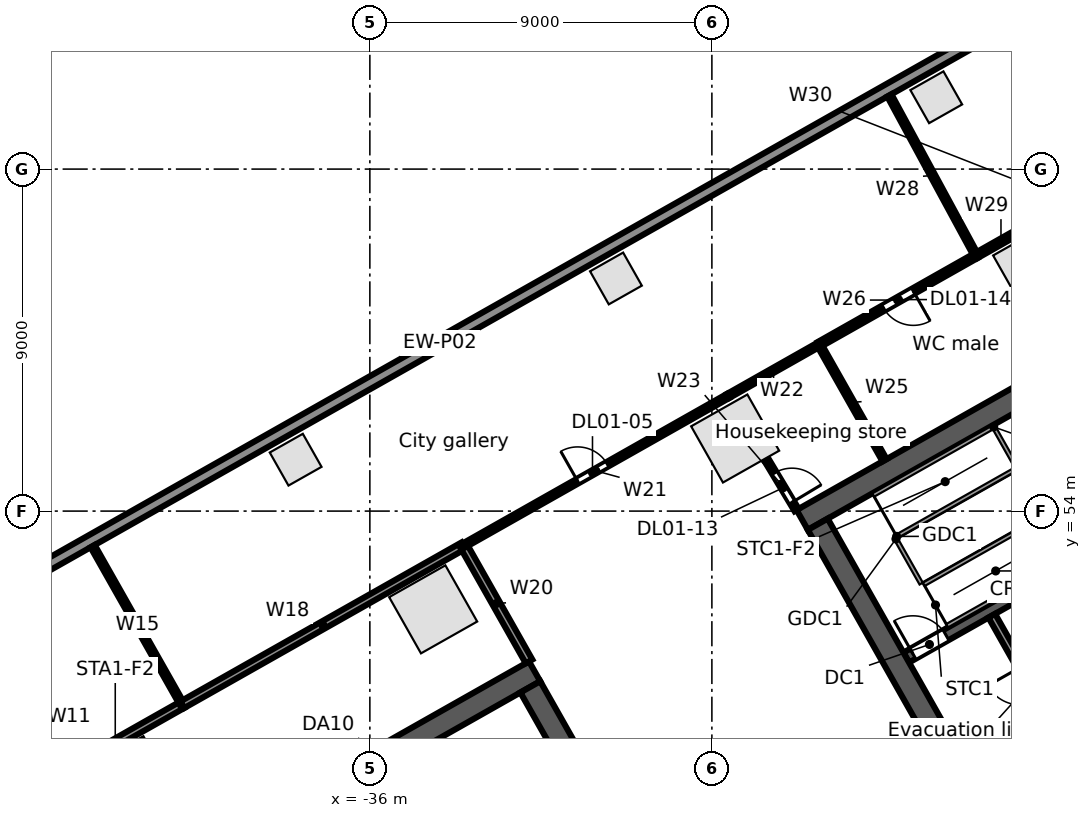
"""IFC4 building model, lengths in metres.
Left out: names, types, materials, properties, quantities, classifications, styles, units other than length and angle.
Written with IfcOpenShell. Run it as: python <this file> out.ifc"""

import sys

from ifc_helpers import new_model, si_unit, direction, frame, frame_2d, origin, origin_2d, place, context, subcontext, project, spatial, rectangle, extrude, element, fill, save


model = new_model("IFC4")
c1 = context("Model", 3, precision=1e-05, world=origin(), true_north=direction((0.0, 1.0)))
c2 = subcontext(c1, "Body", "Model", "MODEL_VIEW")
j1 = project(units=[si_unit("LENGTHUNIT", "METRE"), si_unit("PLANEANGLEUNIT", "RADIAN")], contexts=[c1])
p1 = place(None, origin())
s1 = spatial("IfcSite", under=j1, at=p1, CompositionType="ELEMENT")
p2 = place(p1, origin())
s2 = spatial("IfcBuilding", under=s1, at=p2, CompositionType="ELEMENT")
p3 = place(p2, frame((0.0, 0.0, 11.5)))
s3 = spatial("IfcBuildingStorey", under=s2, at=p3, CompositionType="ELEMENT", Elevation=11.5)
for number, where, z_axis, x_axis in (
    (1, (-18.441, 60.406, 0.0), (0.0, 0.0, 1.0), (-0.87, -0.492, 0.0)),
    (2, (-26.388, 55.91, 0.0), (0.0, 0.0, 1.0), (-0.87, -0.492, 0.0)),
    (3, (-34.334, 51.414, 0.0), (0.0, 0.0, 1.0), (-0.87, -0.492, 0.0)),
    (4, (-42.28, 46.919, 0.0), (0.0, 0.0, 1.0), (-0.87, -0.492, 0.0)),
):
    element("IfcColumn", number, at=place(p3, frame(where, z_axis=z_axis, x_axis=x_axis)), inside=s3, PredefinedType="COLUMN", context=c2, shape_type="SweptSolid", body=[
        extrude(rectangle(XDim=1.7, YDim=1.7, at=origin_2d()), origin(), (0.0, 0.0, 1.0), 5.0),
    ])
for number, where, z_axis, x_axis in (
    (5, (-21.096, 64.89, 0.0), (0.0, 0.0, 1.0), (-0.87, -0.492, 0.0)),
    (6, (-29.524, 60.122, 0.0), (0.0, 0.0, 1.0), (-0.87, -0.492, 0.0)),
    (7, (-37.953, 55.353, 0.0), (0.0, 0.0, 1.0), (-0.87, -0.492, 0.0)),
):
    element("IfcColumn", number, at=place(p3, frame(where, z_axis=z_axis, x_axis=x_axis)), inside=s3, PredefinedType="COLUMN", context=c2, shape_type="SweptSolid", body=[
        extrude(rectangle(XDim=1.0, YDim=1.0, at=origin_2d()), origin(), (0.0, 0.0, 1.0), 5.0),
    ])
p4 = place(p3, frame((-63.707, 41.701, 0.0), z_axis=(0.0, 0.0, 1.0), x_axis=(0.870355510268, 0.492423888277, 0.0)))
e8 = element("IfcWall", 8, at=p4, inside=s3, PredefinedType="STANDARD", context=c2, shape_type="SweptSolid", body=[
    extrude(rectangle(XDim=67.903, YDim=0.3, at=frame_2d((33.952, 0.0))), origin(), (0.0, 0.0, 1.0), 4.65),
])
p5 = place(p3, frame((-46.461, 41.412, 0.0), z_axis=(0.0, 0.0, 1.0), x_axis=(0.870350116061, 0.492433422375, 0.0)))
e9 = element("IfcWall", 9, at=p5, inside=s3, PredefinedType="SOLIDWALL", context=c2, shape_type="SweptSolid", body=[
    extrude(rectangle(XDim=17.0, YDim=0.6, at=frame_2d((8.5, 0.0))), origin(), (0.0, 0.0, 1.0), 4.65),
])
p6 = place(p3, frame((-31.778, 49.374, 0.0), z_axis=(0.0, 0.0, 1.0), x_axis=(0.492433046652, -0.870350328641, 0.0)))
e10 = element("IfcWall", 10, at=p6, inside=s3, PredefinedType="SOLIDWALL", context=c2, shape_type="SweptSolid", body=[
    extrude(rectangle(XDim=12.8, YDim=0.6, at=frame_2d((6.4, 0.0))), origin(), (0.0, 0.0, 1.0), 4.65),
])
p7 = place(p3, frame((-19.718, 46.316, 0.0), z_axis=(0.0, 0.0, 1.0), x_axis=(0.870353963862, 0.492426621528, 0.0)))
e11 = element("IfcWall", 11, at=p7, inside=s3, PredefinedType="SOLIDWALL", context=c2, shape_type="SweptSolid", body=[
    extrude(rectangle(XDim=4.9, YDim=0.3, at=frame_2d((2.45, 0.0))), origin(), (0.0, 0.0, 1.0), 4.65),
])
p8 = place(p7, frame((0.55, 0.0, 0.0)))
e12 = element("IfcOpeningElement", 12, at=p8, cuts=e11, PredefinedType="OPENING", context=c2, shape_type="SweptSolid", body=[
    extrude(rectangle(XDim=1.1, YDim=2.1, at=frame_2d((0.55, 1.05))), frame((0.0, 0.16, 0.0), z_axis=(0.0, -1.0, 0.0), x_axis=(1.0, 0.0, 0.0)), (0.0, 0.0, 1.0), 0.32),
])
p9 = place(p7, frame((3.65, 0.0, 0.0)))
e13 = element("IfcOpeningElement", 13, at=p9, cuts=e11, PredefinedType="OPENING", context=c2, shape_type="SweptSolid", body=[
    extrude(rectangle(XDim=0.9, YDim=2.1, at=frame_2d((0.45, 1.05))), frame((0.0, 0.16, 0.0), z_axis=(0.0, -1.0, 0.0), x_axis=(1.0, 0.0, 0.0)), (0.0, 0.0, 1.0), 0.32),
])
p10 = place(p3, frame((-21.885, 50.146, 0.0), z_axis=(0.0, 0.0, 1.0), x_axis=(0.870359411463, 0.492416992881, 0.0)))
e14 = element("IfcWall", 14, at=p10, inside=s3, PredefinedType="SOLIDWALL", context=c2, shape_type="SweptSolid", body=[
    extrude(rectangle(XDim=7.2, YDim=0.3, at=frame_2d((3.6, 0.0))), origin(), (0.0, 0.0, 1.0), 4.65),
])
p11 = place(p10, frame((0.2, 0.0, 0.0)))
e15 = element("IfcOpeningElement", 15, at=p11, cuts=e14, PredefinedType="OPENING", context=c2, shape_type="SweptSolid", body=[
    extrude(rectangle(XDim=1.0, YDim=2.1, at=frame_2d((0.5, 1.05))), frame((0.0, 0.16, 0.0), z_axis=(0.0, -1.0, 0.0), x_axis=(1.0, 0.0, 0.0)), (0.0, 0.0, 1.0), 0.32),
])
p12 = place(p3, frame((-24.623, 53.767, 0.0), z_axis=(0.0, 0.0, 1.0), x_axis=(0.870356627484, 0.492421913601, 0.0)))
e16 = element("IfcWall", 16, at=p12, inside=s3, PredefinedType="SOLIDWALL", context=c2, shape_type="SweptSolid", body=[
    extrude(rectangle(XDim=15.0, YDim=0.6, at=frame_2d((7.5, 0.0))), origin(), (0.0, 0.0, 1.0), 4.65),
])
p13 = place(p3, frame((-24.214, 53.654, 0.0), z_axis=(0.0, 0.0, 1.0), x_axis=(0.492441221355, -0.870345703448, 0.0)))
e17 = element("IfcWall", 17, at=p13, inside=s3, PredefinedType="SOLIDWALL", context=c2, shape_type="SweptSolid", body=[
    extrude(rectangle(XDim=12.8, YDim=0.6, at=frame_2d((6.4, 0.0))), origin(), (0.0, 0.0, 1.0), 4.65),
])
p14 = place(p3, frame((-19.635, 51.246, 0.0), z_axis=(0.0, 0.0, 1.0), x_axis=(0.492408451753, -0.87036424366, 0.0)))
e18 = element("IfcWall", 18, at=p14, inside=s3, PredefinedType="PARTITIONING", context=c2, shape_type="SweptSolid", body=[
    extrude(rectangle(XDim=4.1, YDim=0.2, at=frame_2d((2.05, 0.0))), origin(), (0.0, 0.0, 1.0), 4.65),
])
p15 = place(p14, frame((1.55, 0.0, 0.0)))
e19 = element("IfcOpeningElement", 19, at=p15, cuts=e18, PredefinedType="OPENING", context=c2, shape_type="SweptSolid", body=[
    extrude(rectangle(XDim=1.0, YDim=2.1, at=frame_2d((0.5, 1.05))), frame((0.0, 0.11, 0.0), z_axis=(0.0, -1.0, 0.0), x_axis=(1.0, 0.0, 0.0)), (0.0, 0.0, 1.0), 0.22),
])
p16 = place(p3, frame((-48.332, 44.719, 0.0), z_axis=(0.0, 0.0, 1.0), x_axis=(0.870331650579, 0.492466057713, 0.0)))
e20 = element("IfcWall", 20, at=p16, inside=s3, PredefinedType="PARTITIONING", context=c2, shape_type="SweptSolid", body=[
    extrude(rectangle(XDim=8.5, YDim=0.2, at=frame_2d((4.25, 0.0))), origin(), (0.0, 0.0, 1.0), 4.03),
])
p17 = place(p16, frame((3.45, 0.0, 0.0)))
e21 = element("IfcOpeningElement", 21, at=p17, cuts=e20, PredefinedType="OPENING", context=c2, shape_type="SweptSolid", body=[
    extrude(rectangle(XDim=1.8, YDim=2.1, at=frame_2d((0.9, 1.05))), frame((0.0, 0.11, 0.0), z_axis=(0.0, -1.0, 0.0), x_axis=(1.0, 0.0, 0.0)), (0.0, 0.0, 1.0), 0.22),
])
p18 = place(p3, frame((-43.295, 53.077, 0.0), z_axis=(0.0, 0.0, 1.0), x_axis=(0.492503605136, -0.87031040378, 0.0)))
e22 = element("IfcWall", 22, at=p18, inside=s3, PredefinedType="PARTITIONING", context=c2, shape_type="SweptSolid", body=[
    extrude(rectangle(XDim=4.793, YDim=0.125, at=frame_2d((2.397, 0.0))), origin(), (0.0, 0.0, 1.0), 3.93),
])
p19 = place(p3, frame((-40.934, 48.905, 0.0), z_axis=(0.0, 0.0, 1.0), x_axis=(0.870387854278, 0.492366716102, 0.0)))
e23 = element("IfcWall", 23, at=p19, inside=s3, PredefinedType="PARTITIONING", context=c2, shape_type="SweptSolid", body=[
    extrude(rectangle(XDim=8.5, YDim=0.2, at=frame_2d((4.25, 0.0))), origin(), (0.0, 0.0, 1.0), 4.03),
])
p20 = place(p3, frame((-33.536, 53.09, 0.0), z_axis=(0.0, 0.0, 1.0), x_axis=(0.492521469645, -0.870300294116, 0.0)))
e24 = element("IfcWall", 24, at=p20, inside=s3, PredefinedType="PARTITIONING", context=c2, shape_type="SweptSolid", body=[
    extrude(rectangle(XDim=3.5, YDim=0.2, at=frame_2d((1.75, 0.0))), origin(), (0.0, 0.0, 1.0), 3.93),
])
p21 = place(p3, frame((-33.536, 53.09, 0.0), z_axis=(0.0, 0.0, 1.0), x_axis=(0.870327439455, 0.492473499928, 0.0)))
e25 = element("IfcWall", 25, at=p21, inside=s3, PredefinedType="PARTITIONING", context=c2, shape_type="SweptSolid", body=[
    extrude(rectangle(XDim=8.0, YDim=0.125, at=frame_2d((4.0, 0.0))), origin(), (0.0, 0.0, 1.0), 3.712),
])
p22 = place(p21, frame((3.45, 0.0, 0.0)))
e26 = element("IfcOpeningElement", 26, at=p22, cuts=e25, PredefinedType="OPENING", context=c2, shape_type="SweptSolid", body=[
    extrude(rectangle(XDim=0.9, YDim=2.1, at=frame_2d((0.45, 1.05))), frame((0.0, 0.073, 0.0), z_axis=(0.0, -1.0, 0.0), x_axis=(1.0, 0.0, 0.0)), (0.0, 0.0, 1.0), 0.145),
])
p23 = place(p3, frame((-26.573, 57.03, 0.0), z_axis=(0.0, 0.0, 1.0), x_axis=(0.870344460795, 0.492443417626, 0.0)))
e27 = element("IfcWall", 27, at=p23, inside=s3, PredefinedType="PARTITIONING", context=c2, shape_type="SweptSolid", body=[
    extrude(rectangle(XDim=2.75, YDim=0.125, at=frame_2d((1.375, 0.0))), origin(), (0.0, 0.0, 1.0), 4.65),
])
p24 = place(p3, frame((-25.587, 55.387, 0.0), z_axis=(0.0, 0.0, 1.0), x_axis=(0.514767546849, -0.857329792268, 0.0)))
e28 = element("IfcWall", 28, at=p24, inside=s3, PredefinedType="PARTITIONING", context=c2, shape_type="SweptSolid", body=[
    extrude(rectangle(XDim=1.585, YDim=0.125, at=frame_2d((0.792, 0.0))), origin(), (0.0, 0.0, 1.0), 4.65),
])
p25 = place(p24, frame((0.45, 0.0, 0.0)))
e29 = element("IfcOpeningElement", 29, at=p25, cuts=e28, PredefinedType="OPENING", context=c2, shape_type="SweptSolid", body=[
    extrude(rectangle(XDim=0.9, YDim=2.1, at=frame_2d((0.45, 1.05))), frame((0.0, 0.073, 0.0), z_axis=(0.0, -1.0, 0.0), x_axis=(1.0, 0.0, 0.0)), (0.0, 0.0, 1.0), 0.145),
])
p26 = place(p3, frame((-24.18, 58.384, 0.0), z_axis=(0.0, 0.0, 1.0), x_axis=(0.492521469645, -0.870300294116, 0.0)))
e30 = element("IfcWall", 30, at=p26, inside=s3, PredefinedType="PARTITIONING", context=c2, shape_type="SweptSolid", body=[
    extrude(rectangle(XDim=3.5, YDim=0.125, at=frame_2d((1.75, 0.0))), origin(), (0.0, 0.0, 1.0), 3.93),
])
p27 = place(p3, frame((-24.18, 58.384, 0.0), z_axis=(0.0, 0.0, 1.0), x_axis=(0.870360772617, 0.492414587, 0.0)))
e31 = element("IfcWall", 31, at=p27, inside=s3, PredefinedType="PARTITIONING", context=c2, shape_type="SweptSolid", body=[
    extrude(rectangle(XDim=4.75, YDim=0.15, at=frame_2d((2.375, 0.0))), origin(), (0.0, 0.0, 1.0), 4.65),
])
p28 = place(p27, frame((1.95, 0.0, 0.0)))
e32 = element("IfcOpeningElement", 32, at=p28, cuts=e31, PredefinedType="OPENING", context=c2, shape_type="SweptSolid", body=[
    extrude(rectangle(XDim=0.9, YDim=2.1, at=frame_2d((0.45, 1.05))), frame((0.0, 0.085, 0.0), z_axis=(0.0, -1.0, 0.0), x_axis=(1.0, 0.0, 0.0)), (0.0, 0.0, 1.0), 0.17),
])
p29 = place(p3, frame((-22.33, 64.939, 0.0), z_axis=(0.0, 0.0, 1.0), x_axis=(0.476360236723, -0.879250206067, 0.0)))
e33 = element("IfcWall", 33, at=p29, inside=s3, PredefinedType="PARTITIONING", context=c2, shape_type="SweptSolid", body=[
    extrude(rectangle(XDim=4.795, YDim=0.125, at=frame_2d((2.397, 0.0))), origin(), (0.0, 0.0, 1.0), 3.93),
])
p30 = place(p3, frame((-20.046, 60.723, 0.0), z_axis=(0.0, 0.0, 1.0), x_axis=(0.870308175411, 0.492507542899, 0.0)))
e34 = element("IfcWall", 34, at=p30, inside=s3, PredefinedType="PARTITIONING", context=c2, shape_type="SweptSolid", body=[
    extrude(rectangle(XDim=1.5, YDim=0.15, at=frame_2d((0.75, 0.0))), origin(), (0.0, 0.0, 1.0), 3.93),
])
p31 = place(p11, origin())
e35 = element("IfcDoor", 35, at=p31, inside=s3, OperationType="SINGLE_SWING_LEFT", PredefinedType="DOOR", context=c2, shape_type="SweptSolid", body=[
    extrude(rectangle(XDim=1.0, YDim=2.1, at=frame_2d((0.5, 1.05))), frame((0.0, 0.025, 0.0), z_axis=(0.0, -1.0, 0.0), x_axis=(1.0, 0.0, 0.0)), (0.0, 0.0, 1.0), 0.05),
])
fill(e15, e35)
p32 = place(p22, origin())
e36 = element("IfcDoor", 36, at=p32, inside=s3, OperationType="SINGLE_SWING_LEFT", PredefinedType="DOOR", context=c2, shape_type="SweptSolid", body=[
    extrude(rectangle(XDim=0.9, YDim=2.1, at=frame_2d((0.45, 1.05))), frame((0.0, 0.025, 0.0), z_axis=(0.0, -1.0, 0.0), x_axis=(1.0, 0.0, 0.0)), (0.0, 0.0, 1.0), 0.05),
])
fill(e26, e36)
p33 = place(p25, origin())
e37 = element("IfcDoor", 37, at=p33, inside=s3, OperationType="SINGLE_SWING_RIGHT", PredefinedType="DOOR", context=c2, shape_type="SweptSolid", body=[
    extrude(rectangle(XDim=0.9, YDim=2.1, at=frame_2d((0.45, 1.05))), frame((0.0, 0.025, 0.0), z_axis=(0.0, -1.0, 0.0), x_axis=(1.0, 0.0, 0.0)), (0.0, 0.0, 1.0), 0.05),
])
fill(e29, e37)
p34 = place(p28, frame((0.9, 0.0, 0.0), z_axis=(0.0, 0.0, 1.0), x_axis=(-1.0, 0.0, 0.0)))
e38 = element("IfcDoor", 38, at=p34, inside=s3, OperationType="SINGLE_SWING_LEFT", PredefinedType="DOOR", context=c2, shape_type="SweptSolid", body=[
    extrude(rectangle(XDim=0.9, YDim=2.1, at=frame_2d((0.45, 1.05))), frame((0.0, 0.025, 0.0), z_axis=(0.0, -1.0, 0.0), x_axis=(1.0, 0.0, 0.0)), (0.0, 0.0, 1.0), 0.05),
])
fill(e32, e38)
save(model, sys.argv[1])
